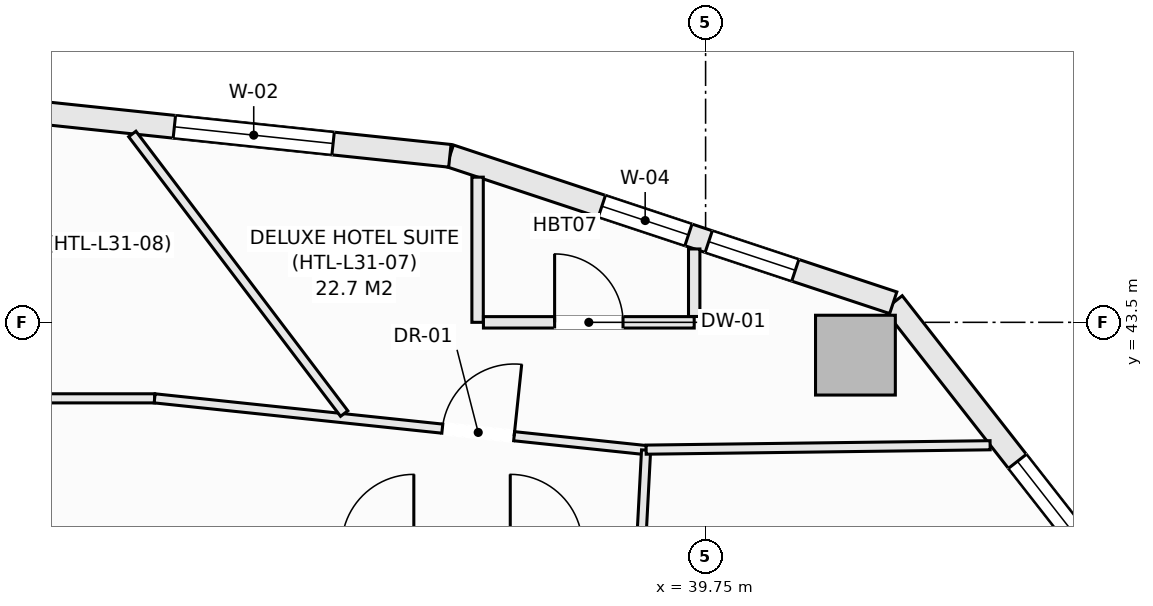
"""IFC4 building model, lengths in metres.
Left out: names, types, materials, properties, quantities, classifications, styles, units other than length and angle.
Written with IfcOpenShell. Run it as: python <this file> out.ifc"""

import sys

from ifc_helpers import new_model, si_unit, direction, frame, frame_2d, origin, origin_2d, place, context, subcontext, project, spatial, rectangle, extrude, element, fill, save


model = new_model("IFC4")
c1 = context("Model", 3, precision=1e-05, world=origin(), true_north=direction((0.0, 1.0)))
c2 = subcontext(c1, "Body", "Model", "MODEL_VIEW")
j1 = project(units=[si_unit("LENGTHUNIT", "METRE"), si_unit("PLANEANGLEUNIT", "RADIAN")], contexts=[c1])
p1 = place(None, origin())
s1 = spatial("IfcSite", under=j1, at=p1, CompositionType="ELEMENT")
p2 = place(p1, origin())
s2 = spatial("IfcBuilding", under=s1, at=p2, CompositionType="ELEMENT")
p3 = place(p2, frame((0.0, 0.0, 125.7)))
s3 = spatial("IfcBuildingStorey", under=s2, at=p3, CompositionType="ELEMENT", Elevation=125.7)
p4 = place(p3, frame((41.721, 43.068, -0.27), z_axis=(0.0, 0.0, 1.0), x_axis=(1.0, 0.0, 0.0)))
e1 = element("IfcColumn", 1, at=p4, inside=s3, PredefinedType="COLUMN", context=c2, shape_type="SweptSolid", body=[
    extrude(rectangle(XDim=1.05, YDim=1.05, at=origin_2d()), origin(), (0.0, 0.0, 1.0), 3.4),
])
p5 = place(p3, frame((42.219, 43.758, 0.0), z_axis=(0.0, 0.0, 1.0), x_axis=(0.616435134162, -0.787405693001, 0.0)))
e2 = element("IfcWall", 2, at=p5, inside=s3, PredefinedType="SOLIDWALL", context=c2, shape_type="SweptSolid", body=[
    extrude(rectangle(XDim=5.759, YDim=0.3, at=frame_2d((2.879, 0.0))), origin(), (0.0, 0.0, 1.0), 2.653),
])
p6 = place(p5, frame((2.65, 0.0, 0.74)))
e3 = element("IfcOpeningElement", 3, at=p6, cuts=e2, PredefinedType="OPENING", context=c2, shape_type="SweptSolid", body=[
    extrude(rectangle(XDim=2.1, YDim=1.7, at=frame_2d((1.05, 0.85))), frame((0.0, 0.16, 0.0), z_axis=(0.0, -1.0, 0.0), x_axis=(1.0, 0.0, 0.0)), (0.0, 0.0, 1.0), 0.32),
])
p7 = place(p3, frame((36.385, 45.691, 0.0), z_axis=(0.0, 0.0, 1.0), x_axis=(0.949238009374, -0.314558741032, 0.0)))
e4 = element("IfcWall", 4, at=p7, inside=s3, PredefinedType="SOLIDWALL", context=c2, shape_type="SweptSolid", body=[
    extrude(rectangle(XDim=6.146, YDim=0.3, at=frame_2d((3.073, 0.0))), origin(), (0.0, 0.0, 1.0), 2.653),
])
p8 = place(p7, frame((2.107, 0.0, 0.74)))
e5 = element("IfcOpeningElement", 5, at=p8, cuts=e4, PredefinedType="OPENING", context=c2, shape_type="SweptSolid", body=[
    extrude(rectangle(XDim=1.2, YDim=1.7, at=frame_2d((0.6, 0.85))), frame((0.0, 0.16, 0.0), z_axis=(0.0, -1.0, 0.0), x_axis=(1.0, 0.0, 0.0)), (0.0, 0.0, 1.0), 0.32),
])
p9 = place(p7, frame((3.588, 0.0, 0.74)))
e6 = element("IfcOpeningElement", 6, at=p9, cuts=e4, PredefinedType="OPENING", context=c2, shape_type="SweptSolid", body=[
    extrude(rectangle(XDim=1.2, YDim=1.7, at=frame_2d((0.6, 0.85))), frame((0.0, 0.16, 0.0), z_axis=(0.0, -1.0, 0.0), x_axis=(1.0, 0.0, 0.0)), (0.0, 0.0, 1.0), 0.32),
])
p10 = place(p3, frame((30.125, 46.35, 0.0), z_axis=(0.0, 0.0, 1.0), x_axis=(0.994498012394, -0.104755445421, 0.0)))
e7 = element("IfcWall", 7, at=p10, inside=s3, PredefinedType="SOLIDWALL", context=c2, shape_type="SweptSolid", body=[
    extrude(rectangle(XDim=6.295, YDim=0.3, at=frame_2d((3.147, 0.0))), origin(), (0.0, 0.0, 1.0), 2.653),
])
p11 = place(p10, frame((2.65, 0.0, 0.74)))
e8 = element("IfcOpeningElement", 8, at=p11, cuts=e7, PredefinedType="OPENING", context=c2, shape_type="SweptSolid", body=[
    extrude(rectangle(XDim=2.1, YDim=1.7, at=frame_2d((1.05, 0.85))), frame((0.0, 0.16, 0.0), z_axis=(0.0, -1.0, 0.0), x_axis=(1.0, 0.0, 0.0)), (0.0, 0.0, 1.0), 0.32),
])
p12 = place(p3, frame((27.749, 42.5, 0.0), z_axis=(0.0, 0.0, 1.0), x_axis=(1.0, 0.0, 0.0)))
e9 = element("IfcWall", 9, at=p12, inside=s3, PredefinedType="PARTITIONING", context=c2, shape_type="SweptSolid", body=[
    extrude(rectangle(XDim=4.752, YDim=0.12, at=frame_2d((2.376, 0.0))), origin(), (0.0, 0.0, 1.0), 3.13),
])
p13 = place(p3, frame((32.501, 42.5, 0.0), z_axis=(0.0, 0.0, 1.0), x_axis=(0.994501131299, -0.104725831799, 0.0)))
e10 = element("IfcWall", 10, at=p13, inside=s3, PredefinedType="PARTITIONING", context=c2, shape_type="SweptSolid", body=[
    extrude(rectangle(XDim=6.502, YDim=0.12, at=frame_2d((3.251, 0.0))), origin(), (0.0, 0.0, 1.0), 3.13),
])
p14 = place(p13, frame((3.806, 0.0, 0.0)))
e11 = element("IfcOpeningElement", 11, at=p14, cuts=e10, PredefinedType="OPENING", context=c2, shape_type="SweptSolid", body=[
    extrude(rectangle(XDim=0.95, YDim=2.1, at=frame_2d((0.475, 1.05))), frame((0.0, 0.07, 0.0), z_axis=(0.0, -1.0, 0.0), x_axis=(1.0, 0.0, 0.0)), (0.0, 0.0, 1.0), 0.14),
])
p15 = place(p3, frame((38.9, 40.55, 0.0), z_axis=(0.0, 0.0, 1.0), x_axis=(0.052851358225, 0.99860239031, 0.0)))
e12 = element("IfcWall", 12, at=p15, inside=s3, PredefinedType="PARTITIONING", context=c2, shape_type="SweptSolid", body=[
    extrude(rectangle(XDim=1.27, YDim=0.12, at=frame_2d((0.635, 0.0))), origin(), (0.0, 0.0, 1.0), 3.13),
])
p16 = place(p3, frame((32.207, 45.978, 0.0), z_axis=(0.0, 0.0, 1.0), x_axis=(0.604029804545, -0.796961727576, 0.0)))
e13 = element("IfcWall", 13, at=p16, inside=s3, PredefinedType="PARTITIONING", context=c2, shape_type="SweptSolid", body=[
    extrude(rectangle(XDim=4.615, YDim=0.12, at=frame_2d((2.308, 0.0))), origin(), (0.0, 0.0, 1.0), 3.13),
])
p17 = place(p3, frame((38.968, 41.825, 0.0), z_axis=(0.0, 0.0, 1.0), x_axis=(0.999918287649, 0.012783505997, 0.0)))
e14 = element("IfcWall", 14, at=p17, inside=s3, PredefinedType="PARTITIONING", context=c2, shape_type="SweptSolid", body=[
    extrude(rectangle(XDim=4.526, YDim=0.12, at=frame_2d((2.263, 0.0))), origin(), (0.0, 0.0, 1.0), 3.13),
])
p18 = place(p3, frame((36.75, 43.5, 0.0), z_axis=(0.0, 0.0, 1.0), x_axis=(0.0, 1.0, 0.0)))
e15 = element("IfcWall", 15, at=p18, inside=s3, PredefinedType="PARTITIONING", context=c2, shape_type="SweptSolid", body=[
    extrude(rectangle(XDim=1.91, YDim=0.15, at=frame_2d((0.955, 0.0))), origin(), (0.0, 0.0, 1.0), 3.13),
])
p19 = place(p3, frame((36.827, 43.5, 0.0), z_axis=(0.0, 0.0, 1.0), x_axis=(1.0, 0.0, 0.0)))
e16 = element("IfcWall", 16, at=p19, inside=s3, PredefinedType="PARTITIONING", context=c2, shape_type="SweptSolid", body=[
    extrude(rectangle(XDim=2.773, YDim=0.15, at=frame_2d((1.387, 0.0))), origin(), (0.0, 0.0, 1.0), 2.653),
])
p20 = place(p19, frame((0.937, 0.0, 0.0)))
e17 = element("IfcOpeningElement", 17, at=p20, cuts=e16, PredefinedType="OPENING", context=c2, shape_type="SweptSolid", body=[
    extrude(rectangle(XDim=0.9, YDim=2.1, at=frame_2d((0.45, 1.05))), frame((0.0, 0.085, 0.0), z_axis=(0.0, -1.0, 0.0), x_axis=(1.0, 0.0, 0.0)), (0.0, 0.0, 1.0), 0.17),
])
p21 = place(p3, frame((39.6, 43.577, 0.0), z_axis=(0.0, 0.0, 1.0), x_axis=(0.0, 1.0, 0.0)))
e18 = element("IfcWall", 18, at=p21, inside=s3, PredefinedType="PARTITIONING", context=c2, shape_type="SweptSolid", body=[
    extrude(rectangle(XDim=0.888, YDim=0.15, at=frame_2d((0.444, 0.0))), origin(), (0.0, 0.0, 1.0), 3.13),
])
p22 = place(p6, origin())
e19 = element("IfcWindow", 19, at=p22, inside=s3, PartitioningType="SINGLE_PANEL", PredefinedType="WINDOW", context=c2, shape_type="SweptSolid", body=[
    extrude(rectangle(XDim=2.1, YDim=1.7, at=frame_2d((1.05, 0.85))), frame((0.0, 0.03, 0.0), z_axis=(0.0, -1.0, 0.0), x_axis=(1.0, 0.0, 0.0)), (0.0, 0.0, 1.0), 0.06),
])
fill(e3, e19)
p23 = place(p8, origin())
e20 = element("IfcWindow", 20, at=p23, inside=s3, PartitioningType="SINGLE_PANEL", PredefinedType="WINDOW", context=c2, shape_type="SweptSolid", body=[
    extrude(rectangle(XDim=1.2, YDim=1.7, at=frame_2d((0.6, 0.85))), frame((0.0, 0.03, 0.0), z_axis=(0.0, -1.0, 0.0), x_axis=(1.0, 0.0, 0.0)), (0.0, 0.0, 1.0), 0.06),
])
fill(e5, e20)
p24 = place(p11, origin())
e21 = element("IfcWindow", 21, at=p24, inside=s3, PartitioningType="SINGLE_PANEL", PredefinedType="WINDOW", context=c2, shape_type="SweptSolid", body=[
    extrude(rectangle(XDim=2.1, YDim=1.7, at=frame_2d((1.05, 0.85))), frame((0.0, 0.03, 0.0), z_axis=(0.0, -1.0, 0.0), x_axis=(1.0, 0.0, 0.0)), (0.0, 0.0, 1.0), 0.06),
])
fill(e8, e21)
p25 = place(p14, origin())
e22 = element("IfcDoor", 22, at=p25, inside=s3, OperationType="SINGLE_SWING_RIGHT", PredefinedType="DOOR", context=c2, shape_type="SweptSolid", body=[
    extrude(rectangle(XDim=0.95, YDim=2.1, at=frame_2d((0.475, 1.05))), frame((0.0, 0.025, 0.0), z_axis=(0.0, -1.0, 0.0), x_axis=(1.0, 0.0, 0.0)), (0.0, 0.0, 1.0), 0.05),
])
fill(e11, e22)
p26 = place(p20, origin())
e23 = element("IfcDoor", 23, at=p26, inside=s3, OperationType="SINGLE_SWING_LEFT", PredefinedType="DOOR", context=c2, shape_type="SweptSolid", body=[
    extrude(rectangle(XDim=0.9, YDim=2.1, at=frame_2d((0.45, 1.05))), frame((0.0, 0.025, 0.0), z_axis=(0.0, -1.0, 0.0), x_axis=(1.0, 0.0, 0.0)), (0.0, 0.0, 1.0), 0.05),
])
fill(e17, e23)
p27 = place(p9, origin())
e24 = element("IfcWindow", 24, at=p27, inside=s3, PartitioningType="SINGLE_PANEL", PredefinedType="WINDOW", context=c2, shape_type="SweptSolid", body=[
    extrude(rectangle(XDim=1.2, YDim=1.7, at=frame_2d((0.6, 0.85))), frame((0.0, 0.03, 0.0), z_axis=(0.0, -1.0, 0.0), x_axis=(1.0, 0.0, 0.0)), (0.0, 0.0, 1.0), 0.06),
])
fill(e6, e24)
save(model, sys.argv[1])
